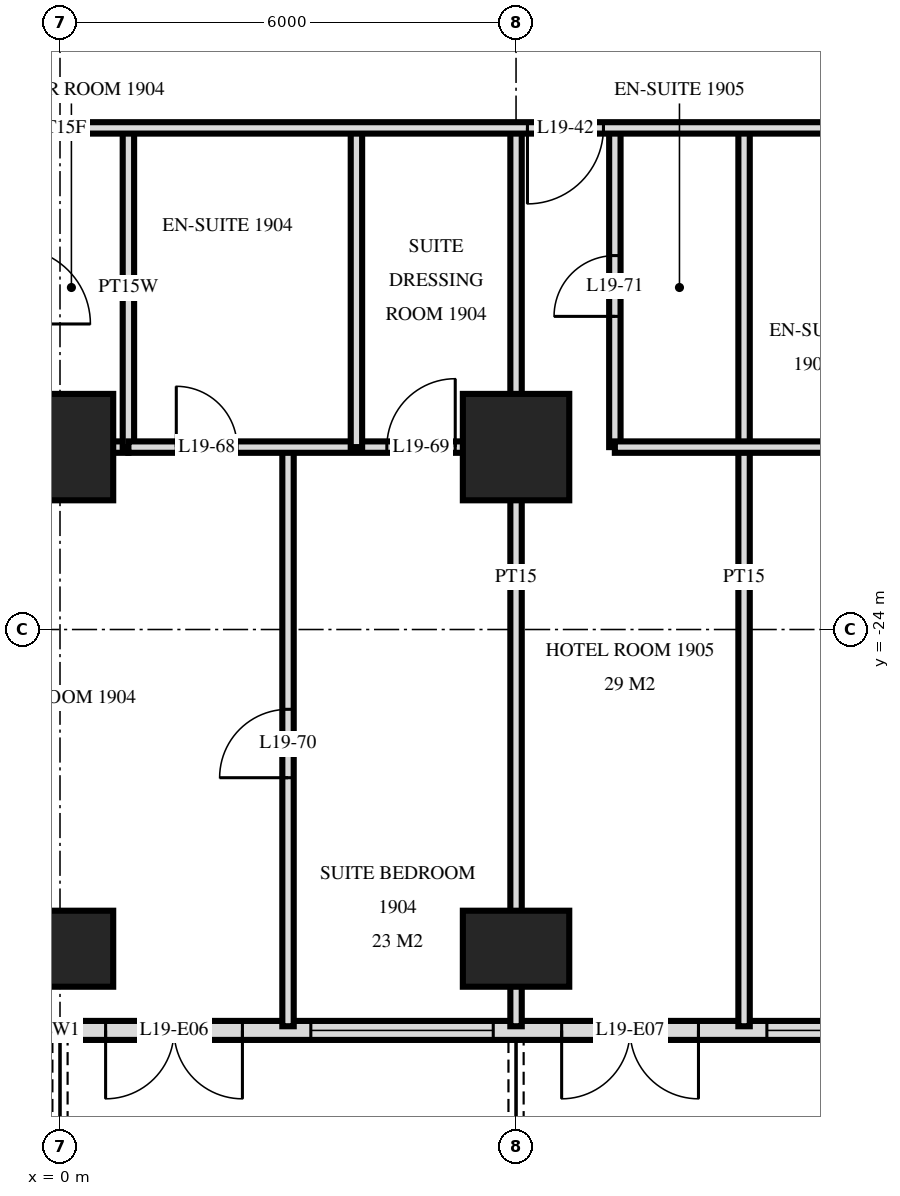
"""IFC4 building model, lengths in metres.
Left out: names, types, materials, properties, quantities, classifications, styles, units other than length and angle.
Written with IfcOpenShell. Run it as: python <this file> out.ifc"""

import sys

from ifc_helpers import new_model, si_unit, direction, frame, frame_2d, origin, origin_2d, place, context, subcontext, project, spatial, rectangle, extrude, element, fill, save


model = new_model("IFC4")
c1 = context("Model", 3, precision=1e-05, world=origin(), true_north=direction((0.0, 1.0)))
c2 = subcontext(c1, "Body", "Model", "MODEL_VIEW")
j1 = project(units=[si_unit("LENGTHUNIT", "METRE"), si_unit("PLANEANGLEUNIT", "RADIAN")], contexts=[c1])
p1 = place(None, origin())
s1 = spatial("IfcSite", under=j1, at=p1, CompositionType="ELEMENT")
p2 = place(p1, origin())
s2 = spatial("IfcBuilding", under=s1, at=p2, CompositionType="ELEMENT")
p3 = place(p2, frame((0.0, 0.0, 78.0)))
s3 = spatial("IfcBuildingStorey", under=s2, at=p3, CompositionType="ELEMENT", Elevation=78.0)
p4 = place(p3, frame((0.0, -28.2, 0.0), z_axis=(0.0, 0.0, 1.0), x_axis=(1.0, 0.0, 0.0)))
e1 = element("IfcColumn", 1, at=p4, inside=s3, PredefinedType="COLUMN", context=c2, shape_type="SweptSolid", body=[
    extrude(rectangle(XDim=1.4, YDim=1.0, at=origin_2d()), origin(), (0.0, 0.0, 1.0), 3.6),
])
p5 = place(p3, frame((0.0, -21.6, 0.0), z_axis=(0.0, 0.0, 1.0), x_axis=(1.0, 0.0, 0.0)))
e2 = element("IfcColumn", 2, at=p5, inside=s3, PredefinedType="COLUMN", context=c2, shape_type="SweptSolid", body=[
    extrude(rectangle(XDim=1.4, YDim=1.4, at=origin_2d()), origin(), (0.0, 0.0, 1.0), 3.6),
])
p6 = place(p3, frame((6.0, -28.2, 0.0), z_axis=(0.0, 0.0, 1.0), x_axis=(1.0, 0.0, 0.0)))
e3 = element("IfcColumn", 3, at=p6, inside=s3, PredefinedType="COLUMN", context=c2, shape_type="SweptSolid", body=[
    extrude(rectangle(XDim=1.4, YDim=1.0, at=origin_2d()), origin(), (0.0, 0.0, 1.0), 3.6),
])
p7 = place(p3, frame((6.0, -21.6, 0.0), z_axis=(0.0, 0.0, 1.0), x_axis=(1.0, 0.0, 0.0)))
e4 = element("IfcColumn", 4, at=p7, inside=s3, PredefinedType="COLUMN", context=c2, shape_type="SweptSolid", body=[
    extrude(rectangle(XDim=1.4, YDim=1.4, at=origin_2d()), origin(), (0.0, 0.0, 1.0), 3.6),
])
p8 = place(p3, frame((-28.775, -29.275, 0.0), z_axis=(0.0, 0.0, 1.0), x_axis=(1.0, 0.0, 0.0)))
e5 = element("IfcWall", 5, at=p8, inside=s3, PredefinedType="SOLIDWALL", context=c2, shape_type="SweptSolid", body=[
    extrude(rectangle(XDim=57.551, YDim=0.25, at=frame_2d((28.775, 0.0))), origin(), (0.0, 0.0, 1.0), 3.32),
])
p9 = place(p8, frame((0.575, 0.0, 0.0)))
e6 = element("IfcOpeningElement", 6, at=p9, cuts=e5, PredefinedType="OPENING", context=c2, shape_type="SweptSolid", body=[
    extrude(rectangle(XDim=1.8, YDim=2.4, at=frame_2d((0.9, 1.2))), frame((0.0, 0.135, 0.0), z_axis=(0.0, -1.0, 0.0), x_axis=(1.0, 0.0, 0.0)), (0.0, 0.0, 1.0), 0.27),
])
p10 = place(p8, frame((5.375, 0.0, 0.0)))
e7 = element("IfcOpeningElement", 7, at=p10, cuts=e5, PredefinedType="OPENING", context=c2, shape_type="SweptSolid", body=[
    extrude(rectangle(XDim=1.8, YDim=2.4, at=frame_2d((0.9, 1.2))), frame((0.0, 0.135, 0.0), z_axis=(0.0, -1.0, 0.0), x_axis=(1.0, 0.0, 0.0)), (0.0, 0.0, 1.0), 0.27),
])
p11 = place(p8, frame((8.075, 0.0, 0.3)))
e8 = element("IfcOpeningElement", 8, at=p11, cuts=e5, PredefinedType="OPENING", context=c2, shape_type="SweptSolid", body=[
    extrude(rectangle(XDim=2.4, YDim=2.1, at=frame_2d((1.2, 1.05))), frame((0.0, 0.135, 0.0), z_axis=(0.0, -1.0, 0.0), x_axis=(1.0, 0.0, 0.0)), (0.0, 0.0, 1.0), 0.27),
])
p12 = place(p8, frame((11.375, 0.0, 0.0)))
e9 = element("IfcOpeningElement", 9, at=p12, cuts=e5, PredefinedType="OPENING", context=c2, shape_type="SweptSolid", body=[
    extrude(rectangle(XDim=1.8, YDim=2.4, at=frame_2d((0.9, 1.2))), frame((0.0, 0.135, 0.0), z_axis=(0.0, -1.0, 0.0), x_axis=(1.0, 0.0, 0.0)), (0.0, 0.0, 1.0), 0.27),
])
p13 = place(p8, frame((14.075, 0.0, 0.3)))
e10 = element("IfcOpeningElement", 10, at=p13, cuts=e5, PredefinedType="OPENING", context=c2, shape_type="SweptSolid", body=[
    extrude(rectangle(XDim=2.4, YDim=2.1, at=frame_2d((1.2, 1.05))), frame((0.0, 0.135, 0.0), z_axis=(0.0, -1.0, 0.0), x_axis=(1.0, 0.0, 0.0)), (0.0, 0.0, 1.0), 0.27),
])
p14 = place(p8, frame((17.075, 0.0, 0.3)))
e11 = element("IfcOpeningElement", 11, at=p14, cuts=e5, PredefinedType="OPENING", context=c2, shape_type="SweptSolid", body=[
    extrude(rectangle(XDim=2.4, YDim=2.1, at=frame_2d((1.2, 1.05))), frame((0.0, 0.135, 0.0), z_axis=(0.0, -1.0, 0.0), x_axis=(1.0, 0.0, 0.0)), (0.0, 0.0, 1.0), 0.27),
])
p15 = place(p8, frame((20.375, 0.0, 0.0)))
e12 = element("IfcOpeningElement", 12, at=p15, cuts=e5, PredefinedType="OPENING", context=c2, shape_type="SweptSolid", body=[
    extrude(rectangle(XDim=1.8, YDim=2.4, at=frame_2d((0.9, 1.2))), frame((0.0, 0.135, 0.0), z_axis=(0.0, -1.0, 0.0), x_axis=(1.0, 0.0, 0.0)), (0.0, 0.0, 1.0), 0.27),
])
p16 = place(p8, frame((23.375, 0.0, 0.0)))
e13 = element("IfcOpeningElement", 13, at=p16, cuts=e5, PredefinedType="OPENING", context=c2, shape_type="SweptSolid", body=[
    extrude(rectangle(XDim=1.8, YDim=2.4, at=frame_2d((0.9, 1.2))), frame((0.0, 0.135, 0.0), z_axis=(0.0, -1.0, 0.0), x_axis=(1.0, 0.0, 0.0)), (0.0, 0.0, 1.0), 0.27),
])
p17 = place(p8, frame((26.075, 0.0, 0.3)))
e14 = element("IfcOpeningElement", 14, at=p17, cuts=e5, PredefinedType="OPENING", context=c2, shape_type="SweptSolid", body=[
    extrude(rectangle(XDim=2.4, YDim=2.1, at=frame_2d((1.2, 1.05))), frame((0.0, 0.135, 0.0), z_axis=(0.0, -1.0, 0.0), x_axis=(1.0, 0.0, 0.0)), (0.0, 0.0, 1.0), 0.27),
])
p18 = place(p8, frame((29.375, 0.0, 0.0)))
e15 = element("IfcOpeningElement", 15, at=p18, cuts=e5, PredefinedType="OPENING", context=c2, shape_type="SweptSolid", body=[
    extrude(rectangle(XDim=1.8, YDim=2.4, at=frame_2d((0.9, 1.2))), frame((0.0, 0.135, 0.0), z_axis=(0.0, -1.0, 0.0), x_axis=(1.0, 0.0, 0.0)), (0.0, 0.0, 1.0), 0.27),
])
p19 = place(p8, frame((32.075, 0.0, 0.3)))
e16 = element("IfcOpeningElement", 16, at=p19, cuts=e5, PredefinedType="OPENING", context=c2, shape_type="SweptSolid", body=[
    extrude(rectangle(XDim=2.4, YDim=2.1, at=frame_2d((1.2, 1.05))), frame((0.0, 0.135, 0.0), z_axis=(0.0, -1.0, 0.0), x_axis=(1.0, 0.0, 0.0)), (0.0, 0.0, 1.0), 0.27),
])
p20 = place(p8, frame((35.375, 0.0, 0.0)))
e17 = element("IfcOpeningElement", 17, at=p20, cuts=e5, PredefinedType="OPENING", context=c2, shape_type="SweptSolid", body=[
    extrude(rectangle(XDim=1.8, YDim=2.4, at=frame_2d((0.9, 1.2))), frame((0.0, 0.135, 0.0), z_axis=(0.0, -1.0, 0.0), x_axis=(1.0, 0.0, 0.0)), (0.0, 0.0, 1.0), 0.27),
])
p21 = place(p8, frame((38.075, 0.0, 0.3)))
e18 = element("IfcOpeningElement", 18, at=p21, cuts=e5, PredefinedType="OPENING", context=c2, shape_type="SweptSolid", body=[
    extrude(rectangle(XDim=2.4, YDim=2.1, at=frame_2d((1.2, 1.05))), frame((0.0, 0.135, 0.0), z_axis=(0.0, -1.0, 0.0), x_axis=(1.0, 0.0, 0.0)), (0.0, 0.0, 1.0), 0.27),
])
p22 = place(p8, frame((41.375, 0.0, 0.0)))
e19 = element("IfcOpeningElement", 19, at=p22, cuts=e5, PredefinedType="OPENING", context=c2, shape_type="SweptSolid", body=[
    extrude(rectangle(XDim=1.8, YDim=2.4, at=frame_2d((0.9, 1.2))), frame((0.0, 0.135, 0.0), z_axis=(0.0, -1.0, 0.0), x_axis=(1.0, 0.0, 0.0)), (0.0, 0.0, 1.0), 0.27),
])
p23 = place(p8, frame((44.075, 0.0, 0.3)))
e20 = element("IfcOpeningElement", 20, at=p23, cuts=e5, PredefinedType="OPENING", context=c2, shape_type="SweptSolid", body=[
    extrude(rectangle(XDim=2.4, YDim=2.1, at=frame_2d((1.2, 1.05))), frame((0.0, 0.135, 0.0), z_axis=(0.0, -1.0, 0.0), x_axis=(1.0, 0.0, 0.0)), (0.0, 0.0, 1.0), 0.27),
])
p24 = place(p8, frame((47.075, 0.0, 0.3)))
e21 = element("IfcOpeningElement", 21, at=p24, cuts=e5, PredefinedType="OPENING", context=c2, shape_type="SweptSolid", body=[
    extrude(rectangle(XDim=2.4, YDim=2.1, at=frame_2d((1.2, 1.05))), frame((0.0, 0.135, 0.0), z_axis=(0.0, -1.0, 0.0), x_axis=(1.0, 0.0, 0.0)), (0.0, 0.0, 1.0), 0.27),
])
p25 = place(p8, frame((50.375, 0.0, 0.0)))
e22 = element("IfcOpeningElement", 22, at=p25, cuts=e5, PredefinedType="OPENING", context=c2, shape_type="SweptSolid", body=[
    extrude(rectangle(XDim=1.8, YDim=2.4, at=frame_2d((0.9, 1.2))), frame((0.0, 0.135, 0.0), z_axis=(0.0, -1.0, 0.0), x_axis=(1.0, 0.0, 0.0)), (0.0, 0.0, 1.0), 0.27),
])
p26 = place(p8, frame((53.375, 0.0, 0.0)))
e23 = element("IfcOpeningElement", 23, at=p26, cuts=e5, PredefinedType="OPENING", context=c2, shape_type="SweptSolid", body=[
    extrude(rectangle(XDim=1.8, YDim=2.4, at=frame_2d((0.9, 1.2))), frame((0.0, 0.135, 0.0), z_axis=(0.0, -1.0, 0.0), x_axis=(1.0, 0.0, 0.0)), (0.0, 0.0, 1.0), 0.27),
])
p27 = place(p3, frame((9.0, -29.22, 0.0), z_axis=(0.0, 0.0, 1.0), x_axis=(0.0, 1.0, 0.0)))
e24 = element("IfcWall", 24, at=p27, inside=s3, PredefinedType="PARTITIONING", context=c2, shape_type="SweptSolid", body=[
    extrude(rectangle(XDim=11.82, YDim=0.15, at=frame_2d((5.91, 0.0))), origin(), (0.0, 0.0, 1.0), 3.32),
])
p28 = place(p3, frame((7.3, -21.6, 0.0), z_axis=(0.0, 0.0, 1.0), x_axis=(0.0, 1.0, 0.0)))
e25 = element("IfcWall", 25, at=p28, inside=s3, PredefinedType="PARTITIONING", context=c2, shape_type="SweptSolid", body=[
    extrude(rectangle(XDim=4.2, YDim=0.15, at=frame_2d((2.1, 0.0))), origin(), (0.0, 0.0, 1.0), 3.32),
])
p29 = place(p28, frame((1.72, 0.0, 0.0)))
e26 = element("IfcOpeningElement", 26, at=p29, cuts=e25, PredefinedType="OPENING", context=c2, shape_type="SweptSolid", body=[
    extrude(rectangle(XDim=0.8, YDim=2.1, at=frame_2d((0.4, 1.05))), frame((0.0, 0.085, 0.0), z_axis=(0.0, -1.0, 0.0), x_axis=(1.0, 0.0, 0.0)), (0.0, 0.0, 1.0), 0.17),
])
p30 = place(p3, frame((6.0, -29.22, 0.0), z_axis=(0.0, 0.0, 1.0), x_axis=(0.0, 1.0, 0.0)))
e27 = element("IfcWall", 27, at=p30, inside=s3, PredefinedType="PARTITIONING", context=c2, shape_type="SweptSolid", body=[
    extrude(rectangle(XDim=11.82, YDim=0.15, at=frame_2d((5.91, 0.0))), origin(), (0.0, 0.0, 1.0), 3.32),
])
p31 = place(p3, frame((3.9, -21.6, 0.0), z_axis=(0.0, 0.0, 1.0), x_axis=(0.0, 1.0, 0.0)))
e28 = element("IfcWall", 28, at=p31, inside=s3, PredefinedType="PARTITIONING", context=c2, shape_type="SweptSolid", body=[
    extrude(rectangle(XDim=4.2, YDim=0.15, at=frame_2d((2.1, 0.0))), origin(), (0.0, 0.0, 1.0), 3.32),
])
p32 = place(p3, frame((3.0, -29.22, 0.0), z_axis=(0.0, 0.0, 1.0), x_axis=(0.0, 1.0, 0.0)))
e29 = element("IfcWall", 29, at=p32, inside=s3, PredefinedType="PARTITIONING", context=c2, shape_type="SweptSolid", body=[
    extrude(rectangle(XDim=7.62, YDim=0.15, at=frame_2d((3.81, 0.0))), origin(), (0.0, 0.0, 1.0), 3.32),
])
p33 = place(p32, frame((3.27, 0.0, 0.0)))
e30 = element("IfcOpeningElement", 30, at=p33, cuts=e29, PredefinedType="OPENING", context=c2, shape_type="SweptSolid", body=[
    extrude(rectangle(XDim=0.9, YDim=2.1, at=frame_2d((0.45, 1.05))), frame((0.0, 0.085, 0.0), z_axis=(0.0, -1.0, 0.0), x_axis=(1.0, 0.0, 0.0)), (0.0, 0.0, 1.0), 0.17),
])
p34 = place(p3, frame((0.9, -21.6, 0.0), z_axis=(0.0, 0.0, 1.0), x_axis=(0.0, 1.0, 0.0)))
e31 = element("IfcWall", 31, at=p34, inside=s3, PredefinedType="PLUMBINGWALL", context=c2, shape_type="SweptSolid", body=[
    extrude(rectangle(XDim=4.2, YDim=0.15, at=frame_2d((2.1, 0.0))), origin(), (0.0, 0.0, 1.0), 3.32),
])
p35 = place(p3, frame((0.9, -21.6, 0.0), z_axis=(0.0, 0.0, 1.0), x_axis=(1.0, 0.0, 0.0)))
e32 = element("IfcWall", 32, at=p35, inside=s3, PredefinedType="PARTITIONING", context=c2, shape_type="SweptSolid", body=[
    extrude(rectangle(XDim=5.1, YDim=0.15, at=frame_2d((2.55, 0.0))), origin(), (0.0, 0.0, 1.0), 3.32),
])
p36 = place(p35, frame((0.63, 0.0, 0.0)))
e33 = element("IfcOpeningElement", 33, at=p36, cuts=e32, PredefinedType="OPENING", context=c2, shape_type="SweptSolid", body=[
    extrude(rectangle(XDim=0.8, YDim=2.1, at=frame_2d((0.4, 1.05))), frame((0.0, 0.085, 0.0), z_axis=(0.0, -1.0, 0.0), x_axis=(1.0, 0.0, 0.0)), (0.0, 0.0, 1.0), 0.17),
])
p37 = place(p35, frame((3.4, 0.0, 0.0)))
e34 = element("IfcOpeningElement", 34, at=p37, cuts=e32, PredefinedType="OPENING", context=c2, shape_type="SweptSolid", body=[
    extrude(rectangle(XDim=0.9, YDim=2.1, at=frame_2d((0.45, 1.05))), frame((0.0, 0.085, 0.0), z_axis=(0.0, -1.0, 0.0), x_axis=(1.0, 0.0, 0.0)), (0.0, 0.0, 1.0), 0.17),
])
p38 = place(p3, frame((7.3, -21.6, 0.0), z_axis=(0.0, 0.0, 1.0), x_axis=(1.0, 0.0, 0.0)))
e35 = element("IfcWall", 35, at=p38, inside=s3, PredefinedType="PARTITIONING", context=c2, shape_type="SweptSolid", body=[
    extrude(rectangle(XDim=4.4, YDim=0.15, at=frame_2d((2.2, 0.0))), origin(), (0.0, 0.0, 1.0), 3.32),
])
p39 = place(p3, frame((-0.6, -21.6, 0.0), z_axis=(0.0, 0.0, 1.0), x_axis=(1.0, 0.0, 0.0)))
e36 = element("IfcWall", 36, at=p39, inside=s3, PredefinedType="PLUMBINGWALL", context=c2, shape_type="SweptSolid", body=[
    extrude(rectangle(XDim=1.5, YDim=0.15, at=frame_2d((0.75, 0.0))), origin(), (0.0, 0.0, 1.0), 3.32),
])
p40 = place(p3, frame((-33.12, -17.4, 0.0), z_axis=(0.0, 0.0, 1.0), x_axis=(1.0, 0.0, 0.0)))
e37 = element("IfcWall", 37, at=p40, inside=s3, PredefinedType="PARTITIONING", context=c2, shape_type="SweptSolid", body=[
    extrude(rectangle(XDim=66.24, YDim=0.15, at=frame_2d((33.12, 0.0))), origin(), (0.0, 0.0, 1.0), 3.32),
])
p41 = place(p40, frame((10.27, 0.0, 0.0)))
e38 = element("IfcOpeningElement", 38, at=p41, cuts=e37, PredefinedType="OPENING", context=c2, shape_type="SweptSolid", body=[
    extrude(rectangle(XDim=1.0, YDim=2.1, at=frame_2d((0.5, 1.05))), frame((0.0, 0.085, 0.0), z_axis=(0.0, -1.0, 0.0), x_axis=(1.0, 0.0, 0.0)), (0.0, 0.0, 1.0), 0.17),
])
p42 = place(p40, frame((16.97, 0.0, 0.0)))
e39 = element("IfcOpeningElement", 39, at=p42, cuts=e37, PredefinedType="OPENING", context=c2, shape_type="SweptSolid", body=[
    extrude(rectangle(XDim=1.0, YDim=2.1, at=frame_2d((0.5, 1.05))), frame((0.0, 0.085, 0.0), z_axis=(0.0, -1.0, 0.0), x_axis=(1.0, 0.0, 0.0)), (0.0, 0.0, 1.0), 0.17),
])
p43 = place(p40, frame((28.42, 0.0, 0.0)))
e40 = element("IfcOpeningElement", 40, at=p43, cuts=e37, PredefinedType="OPENING", context=c2, shape_type="SweptSolid", body=[
    extrude(rectangle(XDim=1.0, YDim=2.1, at=frame_2d((0.5, 1.05))), frame((0.0, 0.085, 0.0), z_axis=(0.0, -1.0, 0.0), x_axis=(1.0, 0.0, 0.0)), (0.0, 0.0, 1.0), 0.17),
])
p44 = place(p40, frame((30.82, 0.0, 0.0)))
e41 = element("IfcOpeningElement", 41, at=p44, cuts=e37, PredefinedType="OPENING", context=c2, shape_type="SweptSolid", body=[
    extrude(rectangle(XDim=1.0, YDim=2.1, at=frame_2d((0.5, 1.05))), frame((0.0, 0.085, 0.0), z_axis=(0.0, -1.0, 0.0), x_axis=(1.0, 0.0, 0.0)), (0.0, 0.0, 1.0), 0.17),
])
p45 = place(p40, frame((39.27, 0.0, 0.0)))
e42 = element("IfcOpeningElement", 42, at=p45, cuts=e37, PredefinedType="OPENING", context=c2, shape_type="SweptSolid", body=[
    extrude(rectangle(XDim=1.0, YDim=2.1, at=frame_2d((0.5, 1.05))), frame((0.0, 0.085, 0.0), z_axis=(0.0, -1.0, 0.0), x_axis=(1.0, 0.0, 0.0)), (0.0, 0.0, 1.0), 0.17),
])
p46 = place(p40, frame((45.22, 0.0, 0.0)))
e43 = element("IfcOpeningElement", 43, at=p46, cuts=e37, PredefinedType="OPENING", context=c2, shape_type="SweptSolid", body=[
    extrude(rectangle(XDim=1.0, YDim=2.1, at=frame_2d((0.5, 1.05))), frame((0.0, 0.085, 0.0), z_axis=(0.0, -1.0, 0.0), x_axis=(1.0, 0.0, 0.0)), (0.0, 0.0, 1.0), 0.17),
])
p47 = place(p40, frame((48.27, 0.0, 0.0)))
e44 = element("IfcOpeningElement", 44, at=p47, cuts=e37, PredefinedType="OPENING", context=c2, shape_type="SweptSolid", body=[
    extrude(rectangle(XDim=1.0, YDim=2.1, at=frame_2d((0.5, 1.05))), frame((0.0, 0.085, 0.0), z_axis=(0.0, -1.0, 0.0), x_axis=(1.0, 0.0, 0.0)), (0.0, 0.0, 1.0), 0.17),
])
p48 = place(p40, frame((1.87, 0.0, 0.0)))
e45 = element("IfcOpeningElement", 45, at=p48, cuts=e37, PredefinedType="OPENING", context=c2, shape_type="SweptSolid", body=[
    extrude(rectangle(XDim=1.0, YDim=2.1, at=frame_2d((0.5, 1.05))), frame((0.0, 0.085, 0.0), z_axis=(0.0, -1.0, 0.0), x_axis=(1.0, 0.0, 0.0)), (0.0, 0.0, 1.0), 0.17),
])
p49 = place(p40, frame((60.37, 0.0, 0.0)))
e46 = element("IfcOpeningElement", 46, at=p49, cuts=e37, PredefinedType="OPENING", context=c2, shape_type="SweptSolid", body=[
    extrude(rectangle(XDim=1.0, YDim=2.1, at=frame_2d((0.5, 1.05))), frame((0.0, 0.085, 0.0), z_axis=(0.0, -1.0, 0.0), x_axis=(1.0, 0.0, 0.0)), (0.0, 0.0, 1.0), 0.17),
])
p50 = place(p18, frame((0.9, 0.0, 0.0), z_axis=(0.0, 0.0, 1.0), x_axis=(-1.0, 0.0, 0.0)))
e47 = element("IfcDoor", 47, at=p50, inside=s3, OperationType="DOUBLE_DOOR_SINGLE_SWING", PredefinedType="DOOR", context=c2, shape_type="SweptSolid", body=[
    extrude(rectangle(XDim=1.8, YDim=2.4, at=frame_2d((0.0, 1.2))), frame((0.0, -0.025, 0.0), z_axis=(0.0, 1.0, 0.0), x_axis=(-1.0, 0.0, 0.0)), (0.0, 0.0, 1.0), 0.05),
])
fill(e15, e47)
p51 = place(p19, origin())
e48 = element("IfcWindow", 48, at=p51, inside=s3, PartitioningType="SINGLE_PANEL", PredefinedType="WINDOW", context=c2, shape_type="SweptSolid", body=[
    extrude(rectangle(XDim=2.4, YDim=2.1, at=frame_2d((1.2, 1.05))), frame((0.0, 0.03, 0.0), z_axis=(0.0, -1.0, 0.0), x_axis=(1.0, 0.0, 0.0)), (0.0, 0.0, 1.0), 0.06),
])
fill(e16, e48)
p52 = place(p20, frame((0.9, 0.0, 0.0), z_axis=(0.0, 0.0, 1.0), x_axis=(-1.0, 0.0, 0.0)))
e49 = element("IfcDoor", 49, at=p52, inside=s3, OperationType="DOUBLE_DOOR_SINGLE_SWING", PredefinedType="DOOR", context=c2, shape_type="SweptSolid", body=[
    extrude(rectangle(XDim=1.8, YDim=2.4, at=frame_2d((0.0, 1.2))), frame((0.0, -0.025, 0.0), z_axis=(0.0, 1.0, 0.0), x_axis=(-1.0, 0.0, 0.0)), (0.0, 0.0, 1.0), 0.05),
])
fill(e17, e49)
p53 = place(p21, origin())
e50 = element("IfcWindow", 50, at=p53, inside=s3, PartitioningType="SINGLE_PANEL", PredefinedType="WINDOW", context=c2, shape_type="SweptSolid", body=[
    extrude(rectangle(XDim=2.4, YDim=2.1, at=frame_2d((1.2, 1.05))), frame((0.0, 0.03, 0.0), z_axis=(0.0, -1.0, 0.0), x_axis=(1.0, 0.0, 0.0)), (0.0, 0.0, 1.0), 0.06),
])
fill(e18, e50)
p54 = place(p45, frame((0.5, 0.0, 0.0), z_axis=(0.0, 0.0, 1.0), x_axis=(-1.0, 0.0, 0.0)))
e51 = element("IfcDoor", 51, at=p54, inside=s3, OperationType="SINGLE_SWING_LEFT", PredefinedType="DOOR", context=c2, shape_type="SweptSolid", body=[
    extrude(rectangle(XDim=1.0, YDim=2.1, at=frame_2d((0.0, 1.05))), frame((0.0, -0.025, 0.0), z_axis=(0.0, 1.0, 0.0), x_axis=(-1.0, 0.0, 0.0)), (0.0, 0.0, 1.0), 0.05),
])
fill(e42, e51)
p55 = place(p36, origin())
e52 = element("IfcDoor", 52, at=p55, inside=s3, OperationType="SINGLE_SWING_RIGHT", PredefinedType="DOOR", context=c2, shape_type="SweptSolid", body=[
    extrude(rectangle(XDim=0.8, YDim=2.1, at=frame_2d((0.4, 1.05))), frame((0.0, 0.025, 0.0), z_axis=(0.0, -1.0, 0.0), x_axis=(1.0, 0.0, 0.0)), (0.0, 0.0, 1.0), 0.05),
])
fill(e33, e52)
p56 = place(p37, origin())
e53 = element("IfcDoor", 53, at=p56, inside=s3, OperationType="SINGLE_SWING_LEFT", PredefinedType="DOOR", context=c2, shape_type="SweptSolid", body=[
    extrude(rectangle(XDim=0.9, YDim=2.1, at=frame_2d((0.45, 1.05))), frame((0.0, 0.025, 0.0), z_axis=(0.0, -1.0, 0.0), x_axis=(1.0, 0.0, 0.0)), (0.0, 0.0, 1.0), 0.05),
])
fill(e34, e53)
p57 = place(p33, origin())
e54 = element("IfcDoor", 54, at=p57, inside=s3, OperationType="SINGLE_SWING_RIGHT", PredefinedType="DOOR", context=c2, shape_type="SweptSolid", body=[
    extrude(rectangle(XDim=0.9, YDim=2.1, at=frame_2d((0.45, 1.05))), frame((0.0, 0.025, 0.0), z_axis=(0.0, -1.0, 0.0), x_axis=(1.0, 0.0, 0.0)), (0.0, 0.0, 1.0), 0.05),
])
fill(e30, e54)
p58 = place(p29, origin())
e55 = element("IfcDoor", 55, at=p58, inside=s3, OperationType="SINGLE_SWING_RIGHT", PredefinedType="DOOR", context=c2, shape_type="SweptSolid", body=[
    extrude(rectangle(XDim=0.8, YDim=2.1, at=frame_2d((0.4, 1.05))), frame((0.0, 0.025, 0.0), z_axis=(0.0, -1.0, 0.0), x_axis=(1.0, 0.0, 0.0)), (0.0, 0.0, 1.0), 0.05),
])
fill(e26, e55)
save(model, sys.argv[1])
